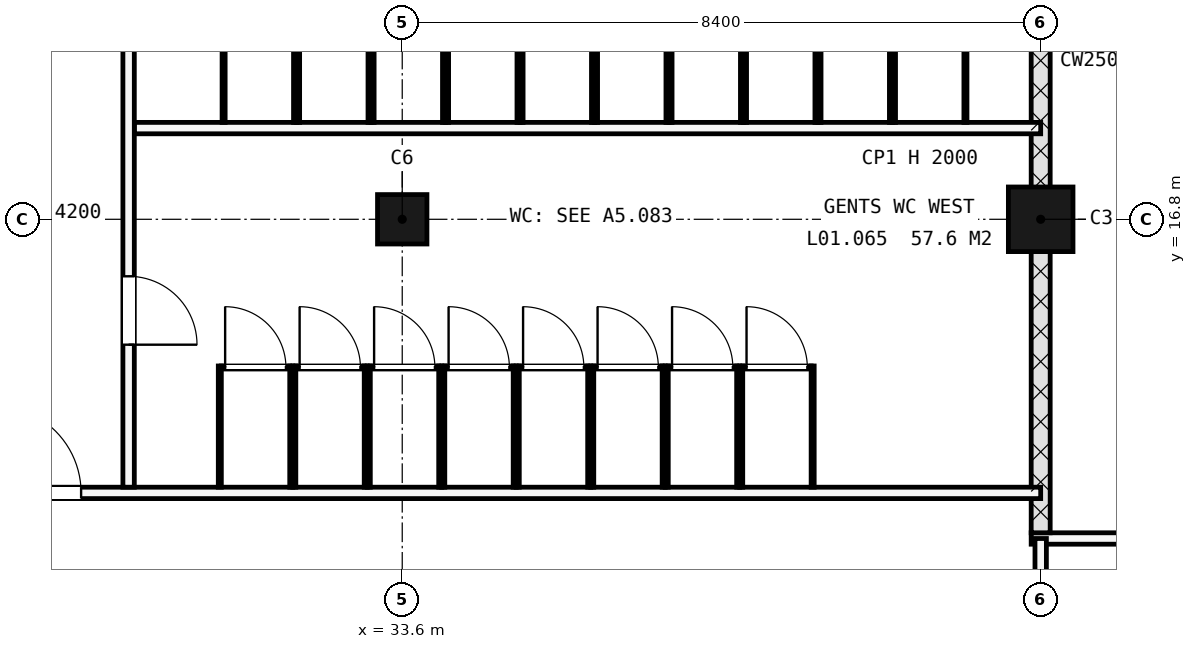
"""IFC4 building model, lengths in metres.
Left out: names, types, materials, properties, quantities, classifications, styles, units other than length and angle.
Written with IfcOpenShell. Run it as: python <this file> out.ifc"""

import sys

from ifc_helpers import new_model, si_unit, direction, frame, frame_2d, origin, origin_2d, place, context, subcontext, project, spatial, rectangle, extrude, element, fill, save


model = new_model("IFC4")
c1 = context("Model", 3, precision=1e-05, world=origin(), true_north=direction((0.0, 1.0)))
c2 = subcontext(c1, "Body", "Model", "MODEL_VIEW")
j1 = project(units=[si_unit("LENGTHUNIT", "METRE"), si_unit("PLANEANGLEUNIT", "RADIAN")], contexts=[c1])
p1 = place(None, origin())
s1 = spatial("IfcSite", under=j1, at=p1, CompositionType="ELEMENT")
p2 = place(p1, origin())
s2 = spatial("IfcBuilding", under=s1, at=p2, CompositionType="ELEMENT")
p3 = place(p2, frame((0.0, 0.0, 5.4)))
s3 = spatial("IfcBuildingStorey", under=s2, at=p3, CompositionType="ELEMENT", Elevation=5.4)
p4 = place(p3, frame((33.6, 16.8, -0.3), z_axis=(0.0, 0.0, 1.0), x_axis=(1.0, 0.0, 0.0)))
e1 = element("IfcColumn", 1, at=p4, inside=s3, PredefinedType="COLUMN", context=c2, shape_type="SweptSolid", body=[
    extrude(rectangle(XDim=0.65, YDim=0.65, at=origin_2d()), origin(), (0.0, 0.0, 1.0), 4.55),
])
p5 = place(p3, frame((42.0, 16.8, -0.3), z_axis=(0.0, 0.0, 1.0), x_axis=(1.0, 0.0, 0.0)))
e2 = element("IfcColumn", 2, at=p5, inside=s3, PredefinedType="COLUMN", context=c2, shape_type="SweptSolid", body=[
    extrude(rectangle(XDim=0.85, YDim=0.85, at=origin_2d()), origin(), (0.0, 0.0, 1.0), 4.55),
])
p6 = place(p3, frame((41.875, 12.6, -0.3), z_axis=(0.0, 0.0, 1.0), x_axis=(1.0, 0.0, 0.0)))
e3 = element("IfcWall", 3, at=p6, inside=s3, PredefinedType="PARTITIONING", context=c2, shape_type="SweptSolid", body=[
    extrude(rectangle(XDim=42.025, YDim=0.15, at=frame_2d((21.012, 0.0))), origin(), (0.0, 0.0, 1.0), 4.5),
])
p7 = place(p3, frame((42.0, 12.675, -0.3), z_axis=(0.0, 0.0, 1.0), x_axis=(0.0, 1.0, 0.0)))
e4 = element("IfcWall", 4, at=p7, inside=s3, PredefinedType="SOLIDWALL", context=c2, shape_type="SweptSolid", body=[
    extrude(rectangle(XDim=12.425, YDim=0.25, at=frame_2d((6.212, 0.0))), origin(), (0.0, 0.0, 1.0), 3.9),
])
p8 = place(p3, frame((27.675, 13.2, 0.0), z_axis=(0.0, 0.0, 1.0), x_axis=(1.0, 0.0, 0.0)))
e5 = element("IfcWall", 5, at=p8, inside=s3, PredefinedType="PARTITIONING", context=c2, shape_type="SweptSolid", body=[
    extrude(rectangle(XDim=14.325, YDim=0.15, at=frame_2d((7.163, 0.0))), origin(), (0.0, 0.0, 1.0), 4.2),
])
p9 = place(p8, frame((0.55, 0.0, 0.0)))
e6 = element("IfcOpeningElement", 6, at=p9, cuts=e5, PredefinedType="OPENING", context=c2, shape_type="SweptSolid", body=[
    extrude(rectangle(XDim=1.15, YDim=2.1, at=frame_2d((0.575, 1.05))), frame((0.0, 0.085, 0.0), z_axis=(0.0, -1.0, 0.0), x_axis=(1.0, 0.0, 0.0)), (0.0, 0.0, 1.0), 0.17),
])
p10 = place(p3, frame((30.075, 18.0, 0.0), z_axis=(0.0, 0.0, 1.0), x_axis=(1.0, 0.0, 0.0)))
e7 = element("IfcWall", 7, at=p10, inside=s3, PredefinedType="PARTITIONING", context=c2, shape_type="SweptSolid", body=[
    extrude(rectangle(XDim=11.925, YDim=0.15, at=frame_2d((5.962, 0.0))), origin(), (0.0, 0.0, 1.0), 4.2),
])
p11 = place(p3, frame((30.0, 13.275, 0.0), z_axis=(0.0, 0.0, 1.0), x_axis=(0.0, 1.0, 0.0)))
e8 = element("IfcWall", 8, at=p11, inside=s3, PredefinedType="PARTITIONING", context=c2, shape_type="SweptSolid", body=[
    extrude(rectangle(XDim=11.825, YDim=0.15, at=frame_2d((5.913, 0.0))), origin(), (0.0, 0.0, 1.0), 4.2),
])
p12 = place(p11, frame((1.875, 0.0, 0.0)))
e9 = element("IfcOpeningElement", 9, at=p12, cuts=e8, PredefinedType="OPENING", context=c2, shape_type="SweptSolid", body=[
    extrude(rectangle(XDim=0.9, YDim=2.1, at=frame_2d((0.45, 1.05))), frame((0.0, 0.085, 0.0), z_axis=(0.0, -1.0, 0.0), x_axis=(1.0, 0.0, 0.0)), (0.0, 0.0, 1.0), 0.17),
])
p13 = place(p11, frame((6.575, 0.0, 0.0)))
e10 = element("IfcOpeningElement", 10, at=p13, cuts=e8, PredefinedType="OPENING", context=c2, shape_type="SweptSolid", body=[
    extrude(rectangle(XDim=0.9, YDim=2.1, at=frame_2d((0.45, 1.05))), frame((0.0, 0.085, 0.0), z_axis=(0.0, -1.0, 0.0), x_axis=(1.0, 0.0, 0.0)), (0.0, 0.0, 1.0), 0.17),
])
p14 = place(p11, frame((10.1, 0.0, 0.0)))
e11 = element("IfcOpeningElement", 11, at=p14, cuts=e8, PredefinedType="OPENING", context=c2, shape_type="SweptSolid", body=[
    extrude(rectangle(XDim=1.05, YDim=2.25, at=frame_2d((0.525, 1.125))), frame((0.0, 0.085, 0.0), z_axis=(0.0, -1.0, 0.0), x_axis=(1.0, 0.0, 0.0)), (0.0, 0.0, 1.0), 0.17),
])
p15 = place(p3, frame((42.0, 8.65, 0.0), z_axis=(0.0, 0.0, 1.0), x_axis=(0.0, 1.0, 0.0)))
e12 = element("IfcWall", 12, at=p15, inside=s3, PredefinedType="PARTITIONING", context=c2, shape_type="SweptSolid", body=[
    extrude(rectangle(XDim=3.95, YDim=0.15, at=frame_2d((1.975, 0.0))), origin(), (0.0, 0.0, 1.0), 3.6),
])
for number, where, z_axis, x_axis in (
    (13, (31.2, 13.275, 0.0), (0.0, 0.0, 1.0), (0.0, 1.0, 0.0)),
    (14, (32.14, 13.275, 0.0), (0.0, 0.0, 1.0), (0.0, 1.0, 0.0)),
):
    element("IfcWall", number, at=place(p3, frame(where, z_axis=z_axis, x_axis=x_axis)), inside=s3, PredefinedType="PARTITIONING", context=c2, shape_type="SweptSolid", body=[
        extrude(rectangle(XDim=1.595, YDim=0.04, at=frame_2d((0.798, 0.0))), origin(), (0.0, 0.0, 1.0), 2.0),
    ])
p16 = place(p3, frame((31.22, 14.85, 0.0), z_axis=(0.0, 0.0, 1.0), x_axis=(1.0, 0.0, 0.0)))
e15 = element("IfcWall", 15, at=p16, inside=s3, PredefinedType="PARTITIONING", context=c2, shape_type="SweptSolid", body=[
    extrude(rectangle(XDim=0.9, YDim=0.04, at=frame_2d((0.45, 0.0))), origin(), (0.0, 0.0, 1.0), 2.0),
])
p17 = place(p16, frame((0.05, 0.0, 0.0)))
e16 = element("IfcOpeningElement", 16, at=p17, cuts=e15, PredefinedType="OPENING", context=c2, shape_type="SweptSolid", body=[
    extrude(rectangle(XDim=0.8, YDim=2.0, at=frame_2d((0.4, 1.0))), frame((0.0, 0.03, 0.0), z_axis=(0.0, -1.0, 0.0), x_axis=(1.0, 0.0, 0.0)), (0.0, 0.0, 1.0), 0.06),
])
for number, where, z_axis, x_axis in (
    (17, (32.18, 13.275, 0.0), (0.0, 0.0, 1.0), (0.0, 1.0, 0.0)),
    (18, (33.12, 13.275, 0.0), (0.0, 0.0, 1.0), (0.0, 1.0, 0.0)),
):
    element("IfcWall", number, at=place(p3, frame(where, z_axis=z_axis, x_axis=x_axis)), inside=s3, PredefinedType="PARTITIONING", context=c2, shape_type="SweptSolid", body=[
        extrude(rectangle(XDim=1.595, YDim=0.04, at=frame_2d((0.798, 0.0))), origin(), (0.0, 0.0, 1.0), 2.0),
    ])
p18 = place(p3, frame((32.2, 14.85, 0.0), z_axis=(0.0, 0.0, 1.0), x_axis=(1.0, 0.0, 0.0)))
e19 = element("IfcWall", 19, at=p18, inside=s3, PredefinedType="PARTITIONING", context=c2, shape_type="SweptSolid", body=[
    extrude(rectangle(XDim=0.9, YDim=0.04, at=frame_2d((0.45, 0.0))), origin(), (0.0, 0.0, 1.0), 2.0),
])
p19 = place(p18, frame((0.05, 0.0, 0.0)))
e20 = element("IfcOpeningElement", 20, at=p19, cuts=e19, PredefinedType="OPENING", context=c2, shape_type="SweptSolid", body=[
    extrude(rectangle(XDim=0.8, YDim=2.0, at=frame_2d((0.4, 1.0))), frame((0.0, 0.03, 0.0), z_axis=(0.0, -1.0, 0.0), x_axis=(1.0, 0.0, 0.0)), (0.0, 0.0, 1.0), 0.06),
])
for number, where, z_axis, x_axis in (
    (21, (33.16, 13.275, 0.0), (0.0, 0.0, 1.0), (0.0, 1.0, 0.0)),
    (22, (34.1, 13.275, 0.0), (0.0, 0.0, 1.0), (0.0, 1.0, 0.0)),
):
    element("IfcWall", number, at=place(p3, frame(where, z_axis=z_axis, x_axis=x_axis)), inside=s3, PredefinedType="PARTITIONING", context=c2, shape_type="SweptSolid", body=[
        extrude(rectangle(XDim=1.595, YDim=0.04, at=frame_2d((0.798, 0.0))), origin(), (0.0, 0.0, 1.0), 2.0),
    ])
p20 = place(p3, frame((33.18, 14.85, 0.0), z_axis=(0.0, 0.0, 1.0), x_axis=(1.0, 0.0, 0.0)))
e23 = element("IfcWall", 23, at=p20, inside=s3, PredefinedType="PARTITIONING", context=c2, shape_type="SweptSolid", body=[
    extrude(rectangle(XDim=0.9, YDim=0.04, at=frame_2d((0.45, 0.0))), origin(), (0.0, 0.0, 1.0), 2.0),
])
p21 = place(p20, frame((0.05, 0.0, 0.0)))
e24 = element("IfcOpeningElement", 24, at=p21, cuts=e23, PredefinedType="OPENING", context=c2, shape_type="SweptSolid", body=[
    extrude(rectangle(XDim=0.8, YDim=2.0, at=frame_2d((0.4, 1.0))), frame((0.0, 0.03, 0.0), z_axis=(0.0, -1.0, 0.0), x_axis=(1.0, 0.0, 0.0)), (0.0, 0.0, 1.0), 0.06),
])
for number, where, z_axis, x_axis in (
    (25, (34.14, 13.275, 0.0), (0.0, 0.0, 1.0), (0.0, 1.0, 0.0)),
    (26, (35.08, 13.275, 0.0), (0.0, 0.0, 1.0), (0.0, 1.0, 0.0)),
):
    element("IfcWall", number, at=place(p3, frame(where, z_axis=z_axis, x_axis=x_axis)), inside=s3, PredefinedType="PARTITIONING", context=c2, shape_type="SweptSolid", body=[
        extrude(rectangle(XDim=1.595, YDim=0.04, at=frame_2d((0.798, 0.0))), origin(), (0.0, 0.0, 1.0), 2.0),
    ])
p22 = place(p3, frame((34.16, 14.85, 0.0), z_axis=(0.0, 0.0, 1.0), x_axis=(1.0, 0.0, 0.0)))
e27 = element("IfcWall", 27, at=p22, inside=s3, PredefinedType="PARTITIONING", context=c2, shape_type="SweptSolid", body=[
    extrude(rectangle(XDim=0.9, YDim=0.04, at=frame_2d((0.45, 0.0))), origin(), (0.0, 0.0, 1.0), 2.0),
])
p23 = place(p22, frame((0.05, 0.0, 0.0)))
e28 = element("IfcOpeningElement", 28, at=p23, cuts=e27, PredefinedType="OPENING", context=c2, shape_type="SweptSolid", body=[
    extrude(rectangle(XDim=0.8, YDim=2.0, at=frame_2d((0.4, 1.0))), frame((0.0, 0.03, 0.0), z_axis=(0.0, -1.0, 0.0), x_axis=(1.0, 0.0, 0.0)), (0.0, 0.0, 1.0), 0.06),
])
for number, where, z_axis, x_axis in (
    (29, (35.12, 13.275, 0.0), (0.0, 0.0, 1.0), (0.0, 1.0, 0.0)),
    (30, (36.06, 13.275, 0.0), (0.0, 0.0, 1.0), (0.0, 1.0, 0.0)),
):
    element("IfcWall", number, at=place(p3, frame(where, z_axis=z_axis, x_axis=x_axis)), inside=s3, PredefinedType="PARTITIONING", context=c2, shape_type="SweptSolid", body=[
        extrude(rectangle(XDim=1.595, YDim=0.04, at=frame_2d((0.798, 0.0))), origin(), (0.0, 0.0, 1.0), 2.0),
    ])
p24 = place(p3, frame((35.14, 14.85, 0.0), z_axis=(0.0, 0.0, 1.0), x_axis=(1.0, 0.0, 0.0)))
e31 = element("IfcWall", 31, at=p24, inside=s3, PredefinedType="PARTITIONING", context=c2, shape_type="SweptSolid", body=[
    extrude(rectangle(XDim=0.9, YDim=0.04, at=frame_2d((0.45, 0.0))), origin(), (0.0, 0.0, 1.0), 2.0),
])
p25 = place(p24, frame((0.05, 0.0, 0.0)))
e32 = element("IfcOpeningElement", 32, at=p25, cuts=e31, PredefinedType="OPENING", context=c2, shape_type="SweptSolid", body=[
    extrude(rectangle(XDim=0.8, YDim=2.0, at=frame_2d((0.4, 1.0))), frame((0.0, 0.03, 0.0), z_axis=(0.0, -1.0, 0.0), x_axis=(1.0, 0.0, 0.0)), (0.0, 0.0, 1.0), 0.06),
])
for number, where, z_axis, x_axis in (
    (33, (36.1, 13.275, 0.0), (0.0, 0.0, 1.0), (0.0, 1.0, 0.0)),
    (34, (37.04, 13.275, 0.0), (0.0, 0.0, 1.0), (0.0, 1.0, 0.0)),
):
    element("IfcWall", number, at=place(p3, frame(where, z_axis=z_axis, x_axis=x_axis)), inside=s3, PredefinedType="PARTITIONING", context=c2, shape_type="SweptSolid", body=[
        extrude(rectangle(XDim=1.595, YDim=0.04, at=frame_2d((0.798, 0.0))), origin(), (0.0, 0.0, 1.0), 2.0),
    ])
p26 = place(p3, frame((36.12, 14.85, 0.0), z_axis=(0.0, 0.0, 1.0), x_axis=(1.0, 0.0, 0.0)))
e35 = element("IfcWall", 35, at=p26, inside=s3, PredefinedType="PARTITIONING", context=c2, shape_type="SweptSolid", body=[
    extrude(rectangle(XDim=0.9, YDim=0.04, at=frame_2d((0.45, 0.0))), origin(), (0.0, 0.0, 1.0), 2.0),
])
p27 = place(p26, frame((0.05, 0.0, 0.0)))
e36 = element("IfcOpeningElement", 36, at=p27, cuts=e35, PredefinedType="OPENING", context=c2, shape_type="SweptSolid", body=[
    extrude(rectangle(XDim=0.8, YDim=2.0, at=frame_2d((0.4, 1.0))), frame((0.0, 0.03, 0.0), z_axis=(0.0, -1.0, 0.0), x_axis=(1.0, 0.0, 0.0)), (0.0, 0.0, 1.0), 0.06),
])
for number, where, z_axis, x_axis in (
    (37, (37.08, 13.275, 0.0), (0.0, 0.0, 1.0), (0.0, 1.0, 0.0)),
    (38, (38.02, 13.275, 0.0), (0.0, 0.0, 1.0), (0.0, 1.0, 0.0)),
):
    element("IfcWall", number, at=place(p3, frame(where, z_axis=z_axis, x_axis=x_axis)), inside=s3, PredefinedType="PARTITIONING", context=c2, shape_type="SweptSolid", body=[
        extrude(rectangle(XDim=1.595, YDim=0.04, at=frame_2d((0.798, 0.0))), origin(), (0.0, 0.0, 1.0), 2.0),
    ])
p28 = place(p3, frame((37.1, 14.85, 0.0), z_axis=(0.0, 0.0, 1.0), x_axis=(1.0, 0.0, 0.0)))
e39 = element("IfcWall", 39, at=p28, inside=s3, PredefinedType="PARTITIONING", context=c2, shape_type="SweptSolid", body=[
    extrude(rectangle(XDim=0.9, YDim=0.04, at=frame_2d((0.45, 0.0))), origin(), (0.0, 0.0, 1.0), 2.0),
])
p29 = place(p28, frame((0.05, 0.0, 0.0)))
e40 = element("IfcOpeningElement", 40, at=p29, cuts=e39, PredefinedType="OPENING", context=c2, shape_type="SweptSolid", body=[
    extrude(rectangle(XDim=0.8, YDim=2.0, at=frame_2d((0.4, 1.0))), frame((0.0, 0.03, 0.0), z_axis=(0.0, -1.0, 0.0), x_axis=(1.0, 0.0, 0.0)), (0.0, 0.0, 1.0), 0.06),
])
for number, where, z_axis, x_axis in (
    (41, (38.06, 13.275, 0.0), (0.0, 0.0, 1.0), (0.0, 1.0, 0.0)),
    (42, (39.0, 13.275, 0.0), (0.0, 0.0, 1.0), (0.0, 1.0, 0.0)),
):
    element("IfcWall", number, at=place(p3, frame(where, z_axis=z_axis, x_axis=x_axis)), inside=s3, PredefinedType="PARTITIONING", context=c2, shape_type="SweptSolid", body=[
        extrude(rectangle(XDim=1.595, YDim=0.04, at=frame_2d((0.798, 0.0))), origin(), (0.0, 0.0, 1.0), 2.0),
    ])
p30 = place(p3, frame((38.08, 14.85, 0.0), z_axis=(0.0, 0.0, 1.0), x_axis=(1.0, 0.0, 0.0)))
e43 = element("IfcWall", 43, at=p30, inside=s3, PredefinedType="PARTITIONING", context=c2, shape_type="SweptSolid", body=[
    extrude(rectangle(XDim=0.9, YDim=0.04, at=frame_2d((0.45, 0.0))), origin(), (0.0, 0.0, 1.0), 2.0),
])
p31 = place(p30, frame((0.05, 0.0, 0.0)))
e44 = element("IfcOpeningElement", 44, at=p31, cuts=e43, PredefinedType="OPENING", context=c2, shape_type="SweptSolid", body=[
    extrude(rectangle(XDim=0.8, YDim=2.0, at=frame_2d((0.4, 1.0))), frame((0.0, 0.03, 0.0), z_axis=(0.0, -1.0, 0.0), x_axis=(1.0, 0.0, 0.0)), (0.0, 0.0, 1.0), 0.06),
])
for number, where, z_axis, x_axis in (
    (45, (31.25, 18.075, 0.0), (0.0, 0.0, 1.0), (0.0, 1.0, 0.0)),
    (46, (32.19, 18.075, 0.0), (0.0, 0.0, 1.0), (0.0, 1.0, 0.0)),
    (47, (32.23, 18.075, 0.0), (0.0, 0.0, 1.0), (0.0, 1.0, 0.0)),
    (48, (33.17, 18.075, 0.0), (0.0, 0.0, 1.0), (0.0, 1.0, 0.0)),
    (49, (33.21, 18.075, 0.0), (0.0, 0.0, 1.0), (0.0, 1.0, 0.0)),
    (50, (34.15, 18.075, 0.0), (0.0, 0.0, 1.0), (0.0, 1.0, 0.0)),
    (51, (34.19, 18.075, 0.0), (0.0, 0.0, 1.0), (0.0, 1.0, 0.0)),
    (52, (35.13, 18.075, 0.0), (0.0, 0.0, 1.0), (0.0, 1.0, 0.0)),
    (53, (35.17, 18.075, 0.0), (0.0, 0.0, 1.0), (0.0, 1.0, 0.0)),
    (54, (36.11, 18.075, 0.0), (0.0, 0.0, 1.0), (0.0, 1.0, 0.0)),
    (55, (36.15, 18.075, 0.0), (0.0, 0.0, 1.0), (0.0, 1.0, 0.0)),
    (56, (37.09, 18.075, 0.0), (0.0, 0.0, 1.0), (0.0, 1.0, 0.0)),
    (57, (37.13, 18.075, 0.0), (0.0, 0.0, 1.0), (0.0, 1.0, 0.0)),
    (58, (38.07, 18.075, 0.0), (0.0, 0.0, 1.0), (0.0, 1.0, 0.0)),
    (59, (38.11, 18.075, 0.0), (0.0, 0.0, 1.0), (0.0, 1.0, 0.0)),
    (60, (39.05, 18.075, 0.0), (0.0, 0.0, 1.0), (0.0, 1.0, 0.0)),
    (61, (39.09, 18.075, 0.0), (0.0, 0.0, 1.0), (0.0, 1.0, 0.0)),
    (62, (40.03, 18.075, 0.0), (0.0, 0.0, 1.0), (0.0, 1.0, 0.0)),
    (63, (40.07, 18.075, 0.0), (0.0, 0.0, 1.0), (0.0, 1.0, 0.0)),
    (64, (41.01, 18.075, 0.0), (0.0, 0.0, 1.0), (0.0, 1.0, 0.0)),
):
    element("IfcWall", number, at=place(p3, frame(where, z_axis=z_axis, x_axis=x_axis)), inside=s3, PredefinedType="PARTITIONING", context=c2, shape_type="SweptSolid", body=[
        extrude(rectangle(XDim=1.595, YDim=0.04, at=frame_2d((0.797, 0.0))), origin(), (0.0, 0.0, 1.0), 2.0),
    ])
p32 = place(p9, origin())
e65 = element("IfcDoor", 65, at=p32, inside=s3, OperationType="SINGLE_SWING_RIGHT", PredefinedType="DOOR", context=c2, shape_type="SweptSolid", body=[
    extrude(rectangle(XDim=1.15, YDim=2.1, at=frame_2d((0.575, 1.05))), frame((0.0, 0.025, 0.0), z_axis=(0.0, -1.0, 0.0), x_axis=(1.0, 0.0, 0.0)), (0.0, 0.0, 1.0), 0.05),
])
fill(e6, e65)
p33 = place(p12, origin())
e66 = element("IfcDoor", 66, at=p33, inside=s3, OperationType="SINGLE_SWING_LEFT", PredefinedType="DOOR", context=c2, shape_type="SweptSolid", body=[
    extrude(rectangle(XDim=0.9, YDim=2.1, at=frame_2d((0.45, 1.05))), frame((0.0, 0.025, 0.0), z_axis=(0.0, -1.0, 0.0), x_axis=(1.0, 0.0, 0.0)), (0.0, 0.0, 1.0), 0.05),
])
fill(e9, e66)
p34 = place(p17, origin())
e67 = element("IfcDoor", 67, at=p34, inside=s3, OperationType="SINGLE_SWING_LEFT", PredefinedType="DOOR", context=c2, shape_type="SweptSolid", body=[
    extrude(rectangle(XDim=0.8, YDim=2.0, at=frame_2d((0.4, 1.0))), frame((0.0, 0.02, 0.0), z_axis=(0.0, -1.0, 0.0), x_axis=(1.0, 0.0, 0.0)), (0.0, 0.0, 1.0), 0.04),
])
fill(e16, e67)
p35 = place(p19, origin())
e68 = element("IfcDoor", 68, at=p35, inside=s3, OperationType="SINGLE_SWING_LEFT", PredefinedType="DOOR", context=c2, shape_type="SweptSolid", body=[
    extrude(rectangle(XDim=0.8, YDim=2.0, at=frame_2d((0.4, 1.0))), frame((0.0, 0.02, 0.0), z_axis=(0.0, -1.0, 0.0), x_axis=(1.0, 0.0, 0.0)), (0.0, 0.0, 1.0), 0.04),
])
fill(e20, e68)
p36 = place(p21, origin())
e69 = element("IfcDoor", 69, at=p36, inside=s3, OperationType="SINGLE_SWING_LEFT", PredefinedType="DOOR", context=c2, shape_type="SweptSolid", body=[
    extrude(rectangle(XDim=0.8, YDim=2.0, at=frame_2d((0.4, 1.0))), frame((0.0, 0.02, 0.0), z_axis=(0.0, -1.0, 0.0), x_axis=(1.0, 0.0, 0.0)), (0.0, 0.0, 1.0), 0.04),
])
fill(e24, e69)
p37 = place(p23, origin())
e70 = element("IfcDoor", 70, at=p37, inside=s3, OperationType="SINGLE_SWING_LEFT", PredefinedType="DOOR", context=c2, shape_type="SweptSolid", body=[
    extrude(rectangle(XDim=0.8, YDim=2.0, at=frame_2d((0.4, 1.0))), frame((0.0, 0.02, 0.0), z_axis=(0.0, -1.0, 0.0), x_axis=(1.0, 0.0, 0.0)), (0.0, 0.0, 1.0), 0.04),
])
fill(e28, e70)
p38 = place(p25, origin())
e71 = element("IfcDoor", 71, at=p38, inside=s3, OperationType="SINGLE_SWING_LEFT", PredefinedType="DOOR", context=c2, shape_type="SweptSolid", body=[
    extrude(rectangle(XDim=0.8, YDim=2.0, at=frame_2d((0.4, 1.0))), frame((0.0, 0.02, 0.0), z_axis=(0.0, -1.0, 0.0), x_axis=(1.0, 0.0, 0.0)), (0.0, 0.0, 1.0), 0.04),
])
fill(e32, e71)
p39 = place(p27, origin())
e72 = element("IfcDoor", 72, at=p39, inside=s3, OperationType="SINGLE_SWING_LEFT", PredefinedType="DOOR", context=c2, shape_type="SweptSolid", body=[
    extrude(rectangle(XDim=0.8, YDim=2.0, at=frame_2d((0.4, 1.0))), frame((0.0, 0.02, 0.0), z_axis=(0.0, -1.0, 0.0), x_axis=(1.0, 0.0, 0.0)), (0.0, 0.0, 1.0), 0.04),
])
fill(e36, e72)
p40 = place(p29, origin())
e73 = element("IfcDoor", 73, at=p40, inside=s3, OperationType="SINGLE_SWING_LEFT", PredefinedType="DOOR", context=c2, shape_type="SweptSolid", body=[
    extrude(rectangle(XDim=0.8, YDim=2.0, at=frame_2d((0.4, 1.0))), frame((0.0, 0.02, 0.0), z_axis=(0.0, -1.0, 0.0), x_axis=(1.0, 0.0, 0.0)), (0.0, 0.0, 1.0), 0.04),
])
fill(e40, e73)
p41 = place(p31, origin())
e74 = element("IfcDoor", 74, at=p41, inside=s3, OperationType="SINGLE_SWING_LEFT", PredefinedType="DOOR", context=c2, shape_type="SweptSolid", body=[
    extrude(rectangle(XDim=0.8, YDim=2.0, at=frame_2d((0.4, 1.0))), frame((0.0, 0.02, 0.0), z_axis=(0.0, -1.0, 0.0), x_axis=(1.0, 0.0, 0.0)), (0.0, 0.0, 1.0), 0.04),
])
fill(e44, e74)
save(model, sys.argv[1])
